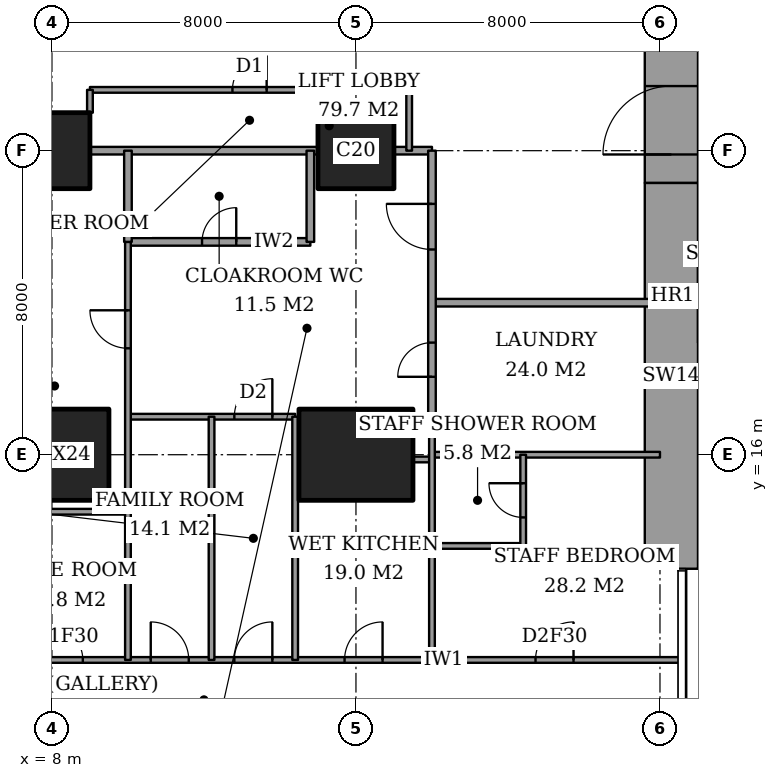
"""IFC4 building model, lengths in metres.
Left out: names, types, materials, properties, quantities, classifications, styles, units other than length and angle.
Written with IfcOpenShell. Run it as: python <this file> out.ifc"""

import sys

from ifc_helpers import new_model, si_unit, direction, frame, frame_2d, origin, origin_2d, place, context, subcontext, project, spatial, rectangle, extrude, element, fill, save


model = new_model("IFC4")
c1 = context("Model", 3, precision=1e-05, world=origin(), true_north=direction((0.0, 1.0)))
c2 = subcontext(c1, "Body", "Model", "MODEL_VIEW")
j1 = project(units=[si_unit("LENGTHUNIT", "METRE"), si_unit("PLANEANGLEUNIT", "RADIAN")], contexts=[c1])
p1 = place(None, origin())
s1 = spatial("IfcSite", under=j1, at=p1, CompositionType="ELEMENT")
p2 = place(p1, origin())
s2 = spatial("IfcBuilding", under=s1, at=p2, CompositionType="ELEMENT")
p3 = place(p2, frame((0.0, 0.0, 117.8)))
s3 = spatial("IfcBuildingStorey", under=s2, at=p3, CompositionType="ELEMENT", Elevation=117.8)
p4 = place(p3, frame((8.0, 16.0, 0.0), z_axis=(0.0, 0.0, 1.0), x_axis=(1.0, 0.0, 0.0)))
e1 = element("IfcColumn", 1, at=p4, inside=s3, PredefinedType="COLUMN", context=c2, shape_type="SweptSolid", body=[
    extrude(rectangle(XDim=3.0, YDim=2.4, at=origin_2d()), origin(), (0.0, 0.0, 1.0), 3.6),
])
p5 = place(p3, frame((8.0, 24.0, 0.0), z_axis=(0.0, 0.0, 1.0), x_axis=(1.0, 0.0, 0.0)))
e2 = element("IfcColumn", 2, at=p5, inside=s3, PredefinedType="COLUMN", context=c2, shape_type="SweptSolid", body=[
    extrude(rectangle(XDim=2.0, YDim=2.0, at=origin_2d()), origin(), (0.0, 0.0, 1.0), 3.6),
])
p6 = place(p3, frame((16.0, 16.0, 0.0), z_axis=(0.0, 0.0, 1.0), x_axis=(1.0, 0.0, 0.0)))
e3 = element("IfcColumn", 3, at=p6, inside=s3, PredefinedType="COLUMN", context=c2, shape_type="SweptSolid", body=[
    extrude(rectangle(XDim=3.0, YDim=2.4, at=origin_2d()), origin(), (0.0, 0.0, 1.0), 3.6),
])
p7 = place(p3, frame((16.0, 24.0, 0.0), z_axis=(0.0, 0.0, 1.0), x_axis=(1.0, 0.0, 0.0)))
e4 = element("IfcColumn", 4, at=p7, inside=s3, PredefinedType="COLUMN", context=c2, shape_type="SweptSolid", body=[
    extrude(rectangle(XDim=2.0, YDim=2.0, at=origin_2d()), origin(), (0.0, 0.0, 1.0), 3.6),
])
p8 = place(p3, frame((24.3, 13.0, 0.0), z_axis=(0.0, 0.0, 1.0), x_axis=(0.0, 1.0, 0.0)))
e5 = element("IfcWall", 5, at=p8, inside=s3, PredefinedType="SHEAR", context=c2, shape_type="SweptSolid", body=[
    extrude(rectangle(XDim=10.15, YDim=1.4, at=frame_2d((5.075, 0.0))), origin(), (0.0, 0.0, 1.0), 3.6),
])
p9 = place(p3, frame((24.3, 23.15, 0.0), z_axis=(0.0, 0.0, 1.0), x_axis=(0.0, 1.0, 0.0)))
e6 = element("IfcWall", 6, at=p9, inside=s3, PredefinedType="SHEAR", context=c2, shape_type="SweptSolid", body=[
    extrude(rectangle(XDim=11.85, YDim=1.4, at=frame_2d((5.925, 0.0))), origin(), (0.0, 0.0, 1.0), 3.6),
])
p10 = place(p9, frame((0.75, 0.0, 0.0)))
e7 = element("IfcOpeningElement", 7, at=p10, cuts=e6, PredefinedType="OPENING", context=c2, shape_type="SweptSolid", body=[
    extrude(rectangle(XDim=1.8, YDim=2.4, at=frame_2d((0.9, 1.2))), frame((0.0, 0.71, 0.0), z_axis=(0.0, -1.0, 0.0), x_axis=(1.0, 0.0, 0.0)), (0.0, 0.0, 1.0), 1.42),
])
p11 = place(p3, frame((-0.45, 10.6, 0.0), z_axis=(0.0, 0.0, 1.0), x_axis=(1.0, 0.0, 0.0)))
e8 = element("IfcWall", 8, at=p11, inside=s3, PredefinedType="PARTITIONING", context=c2, shape_type="SweptSolid", body=[
    extrude(rectangle(XDim=25.011, YDim=0.15, at=frame_2d((12.505, 0.0))), origin(), (0.0, 0.0, 1.0), 3.35),
])
p12 = place(p11, frame((13.25, 0.0, 0.0)))
e9 = element("IfcOpeningElement", 9, at=p12, cuts=e8, PredefinedType="OPENING", context=c2, shape_type="SweptSolid", body=[
    extrude(rectangle(XDim=1.0, YDim=2.1, at=frame_2d((0.5, 1.05))), frame((0.0, 0.085, 0.0), z_axis=(0.0, -1.0, 0.0), x_axis=(1.0, 0.0, 0.0)), (0.0, 0.0, 1.0), 0.17),
])
p13 = place(p11, frame((3.087, 0.0, 0.0)))
e10 = element("IfcOpeningElement", 10, at=p13, cuts=e8, PredefinedType="OPENING", context=c2, shape_type="SweptSolid", body=[
    extrude(rectangle(XDim=1.0, YDim=2.1, at=frame_2d((0.5, 1.05))), frame((0.0, 0.085, 0.0), z_axis=(0.0, -1.0, 0.0), x_axis=(1.0, 0.0, 0.0)), (0.0, 0.0, 1.0), 0.17),
])
p14 = place(p11, frame((8.363, 0.0, 0.0)))
e11 = element("IfcOpeningElement", 11, at=p14, cuts=e8, PredefinedType="OPENING", context=c2, shape_type="SweptSolid", body=[
    extrude(rectangle(XDim=0.9, YDim=2.1, at=frame_2d((0.45, 1.05))), frame((0.0, 0.085, 0.0), z_axis=(0.0, -1.0, 0.0), x_axis=(1.0, 0.0, 0.0)), (0.0, 0.0, 1.0), 0.17),
])
p15 = place(p11, frame((11.05, 0.0, 0.0)))
e12 = element("IfcOpeningElement", 12, at=p15, cuts=e8, PredefinedType="OPENING", context=c2, shape_type="SweptSolid", body=[
    extrude(rectangle(XDim=1.0, YDim=2.1, at=frame_2d((0.5, 1.05))), frame((0.0, 0.085, 0.0), z_axis=(0.0, -1.0, 0.0), x_axis=(1.0, 0.0, 0.0)), (0.0, 0.0, 1.0), 0.17),
])
p16 = place(p11, frame((16.15, 0.0, 0.0)))
e13 = element("IfcOpeningElement", 13, at=p16, cuts=e8, PredefinedType="OPENING", context=c2, shape_type="SweptSolid", body=[
    extrude(rectangle(XDim=1.0, YDim=2.1, at=frame_2d((0.5, 1.05))), frame((0.0, 0.085, 0.0), z_axis=(0.0, -1.0, 0.0), x_axis=(1.0, 0.0, 0.0)), (0.0, 0.0, 1.0), 0.17),
])
p17 = place(p11, frame((21.175, 0.0, 0.0)))
e14 = element("IfcOpeningElement", 14, at=p17, cuts=e8, PredefinedType="OPENING", context=c2, shape_type="SweptSolid", body=[
    extrude(rectangle(XDim=1.0, YDim=2.1, at=frame_2d((0.5, 1.05))), frame((0.0, 0.085, 0.0), z_axis=(0.0, -1.0, 0.0), x_axis=(1.0, 0.0, 0.0)), (0.0, 0.0, 1.0), 0.17),
])
p18 = place(p3, frame((18.0, 13.6, 0.0), z_axis=(0.0, 0.0, 1.0), x_axis=(1.0, 0.0, 0.0)))
e15 = element("IfcWall", 15, at=p18, inside=s3, PredefinedType="PARTITIONING", context=c2, shape_type="SweptSolid", body=[
    extrude(rectangle(XDim=2.4, YDim=0.15, at=frame_2d((1.2, 0.0))), origin(), (0.0, 0.0, 1.0), 3.35),
])
p19 = place(p3, frame((6.725, 14.5, 0.0), z_axis=(0.0, 0.0, 1.0), x_axis=(1.0, 0.0, 0.0)))
e16 = element("IfcWall", 16, at=p19, inside=s3, PredefinedType="PARTITIONING", context=c2, shape_type="SweptSolid", body=[
    extrude(rectangle(XDim=3.275, YDim=0.15, at=frame_2d((1.637, 0.0))), origin(), (0.0, 0.0, 1.0), 3.35),
])
p20 = place(p3, frame((17.5, 15.875, 0.0), z_axis=(0.0, 0.0, 1.0), x_axis=(1.0, 0.0, 0.0)))
e17 = element("IfcWall", 17, at=p20, inside=s3, PredefinedType="PARTITIONING", context=c2, shape_type="SweptSolid", body=[
    extrude(rectangle(XDim=0.5, YDim=0.15, at=frame_2d((0.25, 0.0))), origin(), (0.0, 0.0, 1.0), 2.634),
])
p21 = place(p3, frame((18.0, 16.0, 0.0), z_axis=(0.0, 0.0, 1.0), x_axis=(1.0, 0.0, 0.0)))
e18 = element("IfcWall", 18, at=p21, inside=s3, PredefinedType="PARTITIONING", context=c2, shape_type="SweptSolid", body=[
    extrude(rectangle(XDim=6.0, YDim=0.15, at=frame_2d((3.0, 0.0))), origin(), (0.0, 0.0, 1.0), 2.634),
])
p22 = place(p3, frame((10.0, 17.0, 0.0), z_axis=(0.0, 0.0, 1.0), x_axis=(1.0, 0.0, 0.0)))
e19 = element("IfcWall", 19, at=p22, inside=s3, PredefinedType="PARTITIONING", context=c2, shape_type="SweptSolid", body=[
    extrude(rectangle(XDim=4.4, YDim=0.15, at=frame_2d((2.2, 0.0))), origin(), (0.0, 0.0, 1.0), 3.35),
])
p23 = place(p22, frame((2.8, 0.0, 0.0)))
e20 = element("IfcOpeningElement", 20, at=p23, cuts=e19, PredefinedType="OPENING", context=c2, shape_type="SweptSolid", body=[
    extrude(rectangle(XDim=1.0, YDim=2.1, at=frame_2d((0.5, 1.05))), frame((0.0, 0.085, 0.0), z_axis=(0.0, -1.0, 0.0), x_axis=(1.0, 0.0, 0.0)), (0.0, 0.0, 1.0), 0.17),
])
p24 = place(p3, frame((18.0, 20.0, 0.0), z_axis=(0.0, 0.0, 1.0), x_axis=(1.0, 0.0, 0.0)))
e21 = element("IfcWall", 21, at=p24, inside=s3, PredefinedType="PARTITIONING", context=c2, shape_type="SweptSolid", body=[
    extrude(rectangle(XDim=6.0, YDim=0.2, at=frame_2d((3.0, 0.0))), origin(), (0.0, 0.0, 1.0), 3.35),
])
p25 = place(p3, frame((10.0, 21.6, 0.0), z_axis=(0.0, 0.0, 1.0), x_axis=(1.0, 0.0, 0.0)))
e22 = element("IfcWall", 22, at=p25, inside=s3, PredefinedType="PARTITIONING", context=c2, shape_type="SweptSolid", body=[
    extrude(rectangle(XDim=4.8, YDim=0.2, at=frame_2d((2.4, 0.0))), origin(), (0.0, 0.0, 1.0), 3.35),
])
p26 = place(p25, frame((1.95, 0.0, 0.0)))
e23 = element("IfcOpeningElement", 23, at=p26, cuts=e22, PredefinedType="OPENING", context=c2, shape_type="SweptSolid", body=[
    extrude(rectangle(XDim=0.9, YDim=2.1, at=frame_2d((0.45, 1.05))), frame((0.0, 0.11, 0.0), z_axis=(0.0, -1.0, 0.0), x_axis=(1.0, 0.0, 0.0)), (0.0, 0.0, 1.0), 0.22),
])
p27 = place(p3, frame((9.0, 24.0, 0.0), z_axis=(0.0, 0.0, 1.0), x_axis=(1.0, 0.0, 0.0)))
e24 = element("IfcWall", 24, at=p27, inside=s3, PredefinedType="PARTITIONING", context=c2, shape_type="SweptSolid", body=[
    extrude(rectangle(XDim=6.0, YDim=0.2, at=frame_2d((3.0, 0.0))), origin(), (0.0, 0.0, 1.0), 3.35),
])
p28 = place(p3, frame((17.0, 24.0, 0.0), z_axis=(0.0, 0.0, 1.0), x_axis=(1.0, 0.0, 0.0)))
e25 = element("IfcWall", 25, at=p28, inside=s3, PredefinedType="PARTITIONING", context=c2, shape_type="SweptSolid", body=[
    extrude(rectangle(XDim=1.0, YDim=0.2, at=frame_2d((0.5, 0.0))), origin(), (0.0, 0.0, 1.0), 3.35),
])
p29 = place(p3, frame((9.0, 25.6, 0.0), z_axis=(0.0, 0.0, 1.0), x_axis=(1.0, 0.0, 0.0)))
e26 = element("IfcWall", 26, at=p29, inside=s3, PredefinedType="PARTITIONING", context=c2, shape_type="SweptSolid", body=[
    extrude(rectangle(XDim=8.4, YDim=0.15, at=frame_2d((4.2, 0.0))), origin(), (0.0, 0.0, 1.0), 3.35),
])
p30 = place(p29, frame((3.75, 0.0, 0.0)))
e27 = element("IfcOpeningElement", 27, at=p30, cuts=e26, PredefinedType="OPENING", context=c2, shape_type="SweptSolid", body=[
    extrude(rectangle(XDim=0.9, YDim=2.1, at=frame_2d((0.45, 1.05))), frame((0.0, 0.085, 0.0), z_axis=(0.0, -1.0, 0.0), x_axis=(1.0, 0.0, 0.0)), (0.0, 0.0, 1.0), 0.17),
])
p31 = place(p3, frame((9.0, 25.0, 0.0), z_axis=(0.0, 0.0, 1.0), x_axis=(0.0, 1.0, 0.0)))
e28 = element("IfcWall", 28, at=p31, inside=s3, PredefinedType="PARTITIONING", context=c2, shape_type="SweptSolid", body=[
    extrude(rectangle(XDim=0.6, YDim=0.15, at=frame_2d((0.3, 0.0))), origin(), (0.0, 0.0, 1.0), 3.35),
])
p32 = place(p3, frame((10.0, 21.6, 0.0), z_axis=(0.0, 0.0, 1.0), x_axis=(0.0, 1.0, 0.0)))
e29 = element("IfcWall", 29, at=p32, inside=s3, PredefinedType="PARTITIONING", context=c2, shape_type="SweptSolid", body=[
    extrude(rectangle(XDim=2.4, YDim=0.2, at=frame_2d((1.2, 0.0))), origin(), (0.0, 0.0, 1.0), 3.35),
])
p33 = place(p3, frame((10.0, 10.6, 0.0), z_axis=(0.0, 0.0, 1.0), x_axis=(0.0, 1.0, 0.0)))
e30 = element("IfcWall", 30, at=p33, inside=s3, PredefinedType="PARTITIONING", context=c2, shape_type="SweptSolid", body=[
    extrude(rectangle(XDim=11.0, YDim=0.15, at=frame_2d((5.5, 0.0))), origin(), (0.0, 0.0, 1.0), 3.35),
])
p34 = place(p33, frame((8.2, 0.0, 0.0)))
e31 = element("IfcOpeningElement", 31, at=p34, cuts=e30, PredefinedType="OPENING", context=c2, shape_type="SweptSolid", body=[
    extrude(rectangle(XDim=1.0, YDim=2.1, at=frame_2d((0.5, 1.05))), frame((0.0, 0.085, 0.0), z_axis=(0.0, -1.0, 0.0), x_axis=(1.0, 0.0, 0.0)), (0.0, 0.0, 1.0), 0.17),
])
for number, where, z_axis, x_axis in (
    (32, (12.2, 10.6, 0.0), (0.0, 0.0, 1.0), (0.0, 1.0, 0.0)),
    (33, (14.4, 10.6, 0.0), (0.0, 0.0, 1.0), (0.0, 1.0, 0.0)),
):
    element("IfcWall", number, at=place(p3, frame(where, z_axis=z_axis, x_axis=x_axis)), inside=s3, PredefinedType="PARTITIONING", context=c2, shape_type="SweptSolid", body=[
        extrude(rectangle(XDim=6.4, YDim=0.15, at=frame_2d((3.2, 0.0))), origin(), (0.0, 0.0, 1.0), 3.35),
    ])
p35 = place(p3, frame((14.8, 21.6, 0.0), z_axis=(0.0, 0.0, 1.0), x_axis=(0.0, 1.0, 0.0)))
e34 = element("IfcWall", 34, at=p35, inside=s3, PredefinedType="PARTITIONING", context=c2, shape_type="SweptSolid", body=[
    extrude(rectangle(XDim=2.4, YDim=0.2, at=frame_2d((1.2, 0.0))), origin(), (0.0, 0.0, 1.0), 3.35),
])
p36 = place(p3, frame((17.4, 24.0, 0.0), z_axis=(0.0, 0.0, 1.0), x_axis=(0.0, 1.0, 0.0)))
e35 = element("IfcWall", 35, at=p36, inside=s3, PredefinedType="PARTITIONING", context=c2, shape_type="SweptSolid", body=[
    extrude(rectangle(XDim=1.6, YDim=0.15, at=frame_2d((0.8, 0.0))), origin(), (0.0, 0.0, 1.0), 3.35),
])
p37 = place(p3, frame((18.0, 17.0, 0.0), z_axis=(0.0, 0.0, 1.0), x_axis=(0.0, 1.0, 0.0)))
e36 = element("IfcWall", 36, at=p37, inside=s3, PredefinedType="PARTITIONING", context=c2, shape_type="SweptSolid", body=[
    extrude(rectangle(XDim=7.0, YDim=0.2, at=frame_2d((3.5, 0.0))), origin(), (0.0, 0.0, 1.0), 3.35),
])
p38 = place(p37, frame((4.4, 0.0, 0.0)))
e37 = element("IfcOpeningElement", 37, at=p38, cuts=e36, PredefinedType="OPENING", context=c2, shape_type="SweptSolid", body=[
    extrude(rectangle(XDim=1.2, YDim=2.4, at=frame_2d((0.6, 1.2))), frame((0.0, 0.11, 0.0), z_axis=(0.0, -1.0, 0.0), x_axis=(1.0, 0.0, 0.0)), (0.0, 0.0, 1.0), 0.22),
])
p39 = place(p37, frame((1.05, 0.0, 0.0)))
e38 = element("IfcOpeningElement", 38, at=p39, cuts=e36, PredefinedType="OPENING", context=c2, shape_type="SweptSolid", body=[
    extrude(rectangle(XDim=0.9, YDim=2.1, at=frame_2d((0.45, 1.05))), frame((0.0, 0.11, 0.0), z_axis=(0.0, -1.0, 0.0), x_axis=(1.0, 0.0, 0.0)), (0.0, 0.0, 1.0), 0.22),
])
p40 = place(p3, frame((18.0, 10.6, 0.0), z_axis=(0.0, 0.0, 1.0), x_axis=(0.0, 1.0, 0.0)))
e39 = element("IfcWall", 39, at=p40, inside=s3, PredefinedType="PARTITIONING", context=c2, shape_type="SweptSolid", body=[
    extrude(rectangle(XDim=6.4, YDim=0.15, at=frame_2d((3.2, 0.0))), origin(), (0.0, 0.0, 1.0), 3.35),
])
p41 = place(p3, frame((20.4, 13.6, 0.0), z_axis=(0.0, 0.0, 1.0), x_axis=(0.0, 1.0, 0.0)))
e40 = element("IfcWall", 40, at=p41, inside=s3, PredefinedType="PARTITIONING", context=c2, shape_type="SweptSolid", body=[
    extrude(rectangle(XDim=2.4, YDim=0.15, at=frame_2d((1.2, 0.0))), origin(), (0.0, 0.0, 1.0), 3.35),
])
p42 = place(p41, frame((0.75, 0.0, 0.0)))
e41 = element("IfcOpeningElement", 41, at=p42, cuts=e40, PredefinedType="OPENING", context=c2, shape_type="SweptSolid", body=[
    extrude(rectangle(XDim=0.9, YDim=2.1, at=frame_2d((0.45, 1.05))), frame((0.0, 0.085, 0.0), z_axis=(0.0, -1.0, 0.0), x_axis=(1.0, 0.0, 0.0)), (0.0, 0.0, 1.0), 0.17),
])
p43 = place(p12, origin())
e42 = element("IfcDoor", 42, at=p43, inside=s3, OperationType="SINGLE_SWING_LEFT", PredefinedType="DOOR", context=c2, shape_type="SweptSolid", body=[
    extrude(rectangle(XDim=1.0, YDim=2.1, at=frame_2d((0.5, 1.05))), frame((0.0, 0.025, 0.0), z_axis=(0.0, -1.0, 0.0), x_axis=(1.0, 0.0, 0.0)), (0.0, 0.0, 1.0), 0.05),
])
fill(e9, e42)
p44 = place(p14, origin())
e43 = element("IfcDoor", 43, at=p44, inside=s3, OperationType="SINGLE_SWING_RIGHT", PredefinedType="DOOR", context=c2, shape_type="SweptSolid", body=[
    extrude(rectangle(XDim=0.9, YDim=2.1, at=frame_2d((0.45, 1.05))), frame((0.0, 0.025, 0.0), z_axis=(0.0, -1.0, 0.0), x_axis=(1.0, 0.0, 0.0)), (0.0, 0.0, 1.0), 0.05),
])
fill(e11, e43)
p45 = place(p34, origin())
e44 = element("IfcDoor", 44, at=p45, inside=s3, OperationType="SINGLE_SWING_LEFT", PredefinedType="DOOR", context=c2, shape_type="SweptSolid", body=[
    extrude(rectangle(XDim=1.0, YDim=2.1, at=frame_2d((0.5, 1.05))), frame((0.0, 0.025, 0.0), z_axis=(0.0, -1.0, 0.0), x_axis=(1.0, 0.0, 0.0)), (0.0, 0.0, 1.0), 0.05),
])
fill(e31, e44)
p46 = place(p26, origin())
e45 = element("IfcDoor", 45, at=p46, inside=s3, OperationType="SINGLE_SWING_LEFT", PredefinedType="DOOR", context=c2, shape_type="SweptSolid", body=[
    extrude(rectangle(XDim=0.9, YDim=2.1, at=frame_2d((0.45, 1.05))), frame((0.0, 0.025, 0.0), z_axis=(0.0, -1.0, 0.0), x_axis=(1.0, 0.0, 0.0)), (0.0, 0.0, 1.0), 0.05),
])
fill(e23, e45)
p47 = place(p38, origin())
e46 = element("IfcDoor", 46, at=p47, inside=s3, OperationType="SINGLE_SWING_LEFT", PredefinedType="DOOR", context=c2, shape_type="SweptSolid", body=[
    extrude(rectangle(XDim=1.2, YDim=2.4, at=frame_2d((0.6, 1.2))), frame((0.0, 0.025, 0.0), z_axis=(0.0, -1.0, 0.0), x_axis=(1.0, 0.0, 0.0)), (0.0, 0.0, 1.0), 0.05),
])
fill(e37, e46)
p48 = place(p15, origin())
e47 = element("IfcDoor", 47, at=p48, inside=s3, OperationType="SINGLE_SWING_RIGHT", PredefinedType="DOOR", context=c2, shape_type="SweptSolid", body=[
    extrude(rectangle(XDim=1.0, YDim=2.1, at=frame_2d((0.5, 1.05))), frame((0.0, 0.025, 0.0), z_axis=(0.0, -1.0, 0.0), x_axis=(1.0, 0.0, 0.0)), (0.0, 0.0, 1.0), 0.05),
])
fill(e12, e47)
p49 = place(p23, origin())
e48 = element("IfcDoor", 48, at=p49, inside=s3, OperationType="SINGLE_SWING_LEFT", PredefinedType="DOOR", context=c2, shape_type="SweptSolid", body=[
    extrude(rectangle(XDim=1.0, YDim=2.1, at=frame_2d((0.5, 1.05))), frame((0.0, 0.025, 0.0), z_axis=(0.0, -1.0, 0.0), x_axis=(1.0, 0.0, 0.0)), (0.0, 0.0, 1.0), 0.05),
])
fill(e20, e48)
p50 = place(p16, origin())
e49 = element("IfcDoor", 49, at=p50, inside=s3, OperationType="SINGLE_SWING_LEFT", PredefinedType="DOOR", context=c2, shape_type="SweptSolid", body=[
    extrude(rectangle(XDim=1.0, YDim=2.1, at=frame_2d((0.5, 1.05))), frame((0.0, 0.025, 0.0), z_axis=(0.0, -1.0, 0.0), x_axis=(1.0, 0.0, 0.0)), (0.0, 0.0, 1.0), 0.05),
])
fill(e13, e49)
p51 = place(p42, origin())
e50 = element("IfcDoor", 50, at=p51, inside=s3, OperationType="SINGLE_SWING_LEFT", PredefinedType="DOOR", context=c2, shape_type="SweptSolid", body=[
    extrude(rectangle(XDim=0.9, YDim=2.1, at=frame_2d((0.45, 1.05))), frame((0.0, 0.025, 0.0), z_axis=(0.0, -1.0, 0.0), x_axis=(1.0, 0.0, 0.0)), (0.0, 0.0, 1.0), 0.05),
])
fill(e41, e50)
p52 = place(p17, origin())
e51 = element("IfcDoor", 51, at=p52, inside=s3, OperationType="SINGLE_SWING_LEFT", PredefinedType="DOOR", context=c2, shape_type="SweptSolid", body=[
    extrude(rectangle(XDim=1.0, YDim=2.1, at=frame_2d((0.5, 1.05))), frame((0.0, 0.025, 0.0), z_axis=(0.0, -1.0, 0.0), x_axis=(1.0, 0.0, 0.0)), (0.0, 0.0, 1.0), 0.05),
])
fill(e14, e51)
p53 = place(p39, origin())
e52 = element("IfcDoor", 52, at=p53, inside=s3, OperationType="SINGLE_SWING_RIGHT", PredefinedType="DOOR", context=c2, shape_type="SweptSolid", body=[
    extrude(rectangle(XDim=0.9, YDim=2.1, at=frame_2d((0.45, 1.05))), frame((0.0, 0.025, 0.0), z_axis=(0.0, -1.0, 0.0), x_axis=(1.0, 0.0, 0.0)), (0.0, 0.0, 1.0), 0.05),
])
fill(e38, e52)
p54 = place(p30, origin())
e53 = element("IfcDoor", 53, at=p54, inside=s3, OperationType="SINGLE_SWING_LEFT", PredefinedType="DOOR", context=c2, shape_type="SweptSolid", body=[
    extrude(rectangle(XDim=0.9, YDim=2.1, at=frame_2d((0.45, 1.05))), frame((0.0, 0.025, 0.0), z_axis=(0.0, -1.0, 0.0), x_axis=(1.0, 0.0, 0.0)), (0.0, 0.0, 1.0), 0.05),
])
fill(e27, e53)
p55 = place(p10, origin())
e54 = element("IfcDoor", 54, at=p55, inside=s3, OperationType="DOUBLE_DOOR_DOUBLE_SWING", PredefinedType="DOOR", context=c2, shape_type="SweptSolid", body=[
    extrude(rectangle(XDim=1.8, YDim=2.4, at=frame_2d((0.9, 1.2))), frame((0.0, 0.025, 0.0), z_axis=(0.0, -1.0, 0.0), x_axis=(1.0, 0.0, 0.0)), (0.0, 0.0, 1.0), 0.05),
])
fill(e7, e54)
save(model, sys.argv[1])
